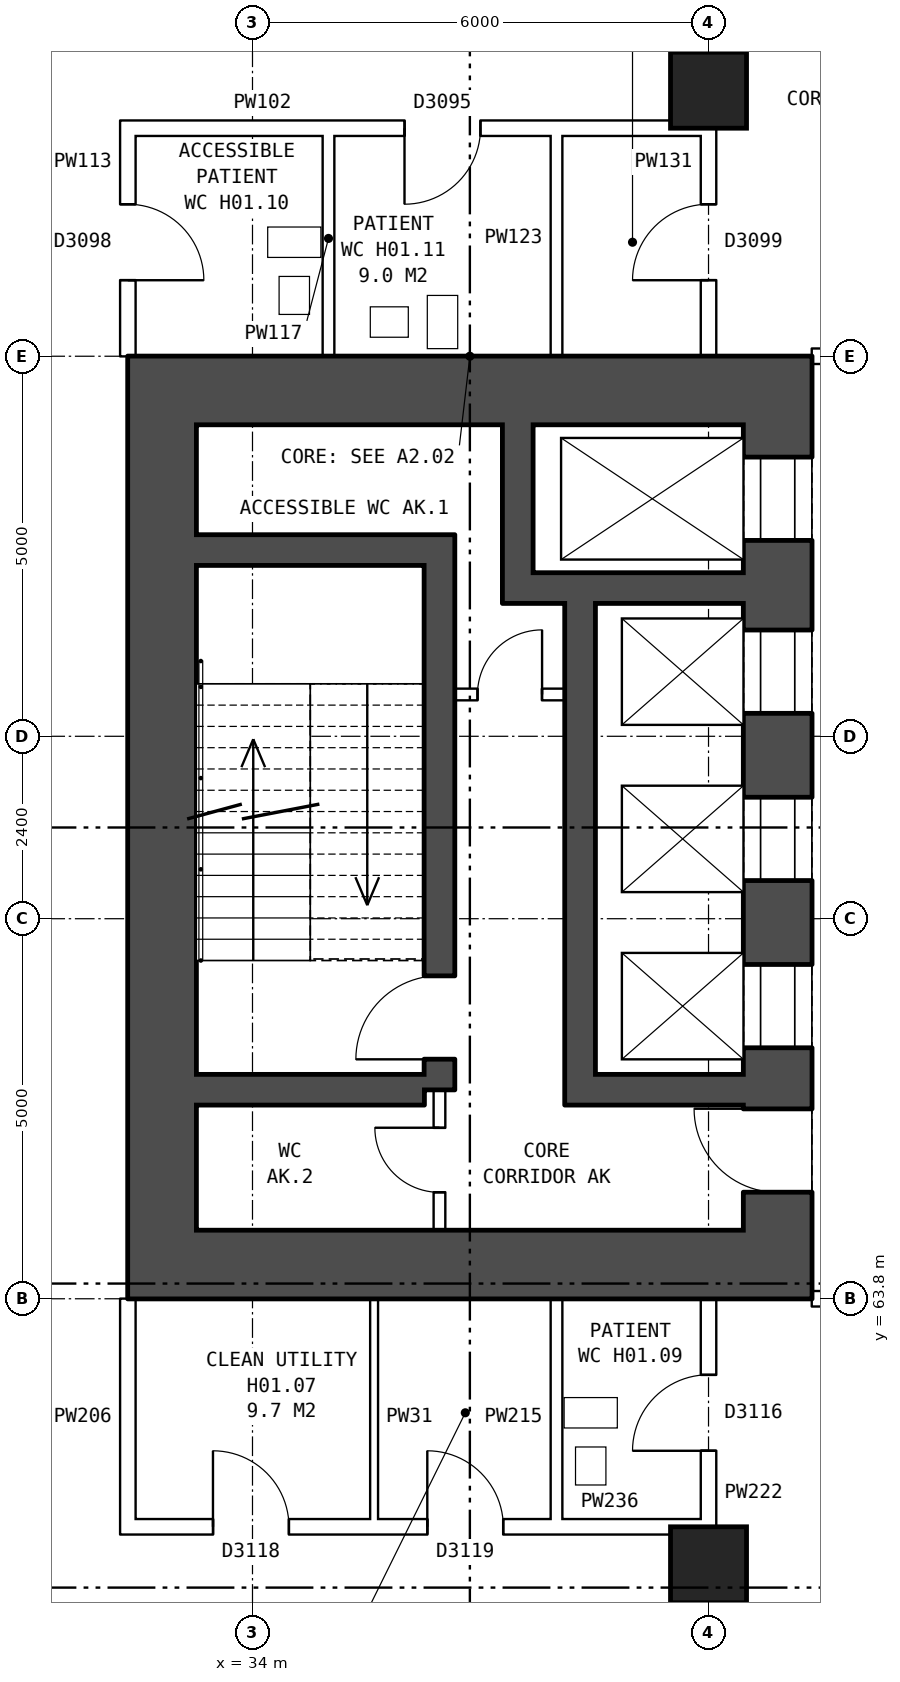
"""IFC4 building model, lengths in metres.
Left out: names, types, materials, properties, quantities, classifications, styles, units other than length and angle.
Written with IfcOpenShell. Run it as: python <this file> out.ifc"""

import sys

from ifc_helpers import new_model, si_unit, direction, frame, frame_2d, origin, origin_2d, place, context, subcontext, project, spatial, rectangle, extrude, element, fill, save


model = new_model("IFC4")
c1 = context("Model", 3, precision=1e-05, world=origin(), true_north=direction((0.0, 1.0)))
c2 = subcontext(c1, "Body", "Model", "MODEL_VIEW")
j1 = project(units=[si_unit("LENGTHUNIT", "METRE"), si_unit("PLANEANGLEUNIT", "RADIAN")], contexts=[c1])
p1 = place(None, origin())
s1 = spatial("IfcSite", under=j1, at=p1, CompositionType="ELEMENT")
p2 = place(p1, origin())
s2 = spatial("IfcBuilding", under=s1, at=p2, CompositionType="ELEMENT")
p3 = place(p2, frame((0.0, 0.0, 5.5)))
s3 = spatial("IfcBuildingStorey", under=s2, at=p3, CompositionType="ELEMENT", Elevation=5.5)
for number, where, z_axis, x_axis in (
    (1, (40.0, 60.3, 0.0), (0.0, 0.0, 1.0), (1.0, 0.0, 0.0)),
    (2, (40.0, 79.7, 0.0), (0.0, 0.0, 1.0), (1.0, 0.0, 0.0)),
):
    element("IfcColumn", number, at=place(p3, frame(where, z_axis=z_axis, x_axis=x_axis)), inside=s3, PredefinedType="COLUMN", context=c2, shape_type="SweptSolid", body=[
        extrude(rectangle(XDim=1.0, YDim=1.0, at=origin_2d()), origin(), (0.0, 0.0, 1.0), 4.3),
    ])
p4 = place(p3, frame((40.91, 75.3, 0.0), z_axis=(0.0, 0.0, 1.0), x_axis=(0.0, -1.0, 0.0)))
e3 = element("IfcWall", 3, at=p4, inside=s3, PredefinedType="SHEAR", context=c2, shape_type="SweptSolid", body=[
    extrude(rectangle(XDim=10.6, YDim=0.9, at=frame_2d((5.3, 0.0))), origin(), (0.0, 0.0, 1.0), 4.3),
])
p5 = place(p4, frame((0.425, 0.0, 0.0)))
e4 = element("IfcOpeningElement", 4, at=p5, cuts=e3, PredefinedType="OPENING", context=c2, shape_type="SweptSolid", body=[
    extrude(rectangle(XDim=1.1, YDim=2.1, at=frame_2d((0.55, 1.05))), frame((0.0, 0.46, 0.0), z_axis=(0.0, -1.0, 0.0), x_axis=(1.0, 0.0, 0.0)), (0.0, 0.0, 1.0), 0.92),
])
p6 = place(p4, frame((2.7, 0.0, 0.0)))
e5 = element("IfcOpeningElement", 5, at=p6, cuts=e3, PredefinedType="OPENING", context=c2, shape_type="SweptSolid", body=[
    extrude(rectangle(XDim=1.1, YDim=2.1, at=frame_2d((0.55, 1.05))), frame((0.0, 0.46, 0.0), z_axis=(0.0, -1.0, 0.0), x_axis=(1.0, 0.0, 0.0)), (0.0, 0.0, 1.0), 0.92),
])
p7 = place(p4, frame((4.9, 0.0, 0.0)))
e6 = element("IfcOpeningElement", 6, at=p7, cuts=e3, PredefinedType="OPENING", context=c2, shape_type="SweptSolid", body=[
    extrude(rectangle(XDim=1.1, YDim=2.1, at=frame_2d((0.55, 1.05))), frame((0.0, 0.46, 0.0), z_axis=(0.0, -1.0, 0.0), x_axis=(1.0, 0.0, 0.0)), (0.0, 0.0, 1.0), 0.92),
])
p8 = place(p4, frame((7.1, 0.0, 0.0)))
e7 = element("IfcOpeningElement", 7, at=p8, cuts=e3, PredefinedType="OPENING", context=c2, shape_type="SweptSolid", body=[
    extrude(rectangle(XDim=1.1, YDim=2.1, at=frame_2d((0.55, 1.05))), frame((0.0, 0.46, 0.0), z_axis=(0.0, -1.0, 0.0), x_axis=(1.0, 0.0, 0.0)), (0.0, 0.0, 1.0), 0.92),
])
p9 = place(p4, frame((9.0, 0.0, 0.0)))
e8 = element("IfcOpeningElement", 8, at=p9, cuts=e3, PredefinedType="OPENING", context=c2, shape_type="SweptSolid", body=[
    extrude(rectangle(XDim=1.1, YDim=2.1, at=frame_2d((0.55, 1.05))), frame((0.0, 0.46, 0.0), z_axis=(0.0, -1.0, 0.0), x_axis=(1.0, 0.0, 0.0)), (0.0, 0.0, 1.0), 0.92),
])
p10 = place(p3, frame((32.81, 75.3, 0.0), z_axis=(0.0, 0.0, 1.0), x_axis=(0.0, -1.0, 0.0)))
e9 = element("IfcWall", 9, at=p10, inside=s3, PredefinedType="SHEAR", context=c2, shape_type="SweptSolid", body=[
    extrude(rectangle(XDim=10.6, YDim=0.9, at=frame_2d((5.3, 0.0))), origin(), (0.0, 0.0, 1.0), 4.3),
])
for number, where, z_axis, x_axis in (
    (10, (41.36, 75.75, 0.0), (0.0, 0.0, 1.0), (-1.0, 0.0, 0.0)),
    (11, (41.36, 64.25, 0.0), (0.0, 0.0, 1.0), (-1.0, 0.0, 0.0)),
):
    element("IfcWall", number, at=place(p3, frame(where, z_axis=z_axis, x_axis=x_axis)), inside=s3, PredefinedType="SHEAR", context=c2, shape_type="SweptSolid", body=[
        extrude(rectangle(XDim=9.0, YDim=0.9, at=frame_2d((4.5, 0.0))), origin(), (0.0, 0.0, 1.0), 4.3),
    ])
p11 = place(p3, frame((36.26, 73.65, 0.0), z_axis=(0.0, 0.0, 1.0), x_axis=(-1.0, 0.0, 0.0)))
e12 = element("IfcWall", 12, at=p11, inside=s3, PredefinedType="SHEAR", context=c2, shape_type="SweptSolid", body=[
    extrude(rectangle(XDim=3.0, YDim=0.4, at=frame_2d((1.5, 0.0))), origin(), (0.0, 0.0, 1.0), 4.3),
])
p12 = place(p3, frame((40.46, 73.15, 0.0), z_axis=(0.0, 0.0, 1.0), x_axis=(-1.0, 0.0, 0.0)))
e13 = element("IfcWall", 13, at=p12, inside=s3, PredefinedType="SHEAR", context=c2, shape_type="SweptSolid", body=[
    extrude(rectangle(XDim=3.17, YDim=0.4, at=frame_2d((1.585, 0.0))), origin(), (0.0, 0.0, 1.0), 4.3),
])
p13 = place(p3, frame((38.11, 71.75, 0.0), z_axis=(0.0, 0.0, 1.0), x_axis=(-1.0, 0.0, 0.0)))
e14 = element("IfcWall", 14, at=p13, inside=s3, PredefinedType="PARTITIONING", context=c2, shape_type="SweptSolid", body=[
    extrude(rectangle(XDim=1.45, YDim=0.15, at=frame_2d((0.725, 0.0))), origin(), (0.0, 0.0, 1.0), 4.3),
])
p14 = place(p13, frame((0.3, 0.0, 0.0)))
e15 = element("IfcOpeningElement", 15, at=p14, cuts=e14, PredefinedType="OPENING", context=c2, shape_type="SweptSolid", body=[
    extrude(rectangle(XDim=0.85, YDim=2.1, at=frame_2d((0.425, 1.05))), frame((0.0, 0.085, 0.0), z_axis=(0.0, -1.0, 0.0), x_axis=(1.0, 0.0, 0.0)), (0.0, 0.0, 1.0), 0.17),
])
p15 = place(p3, frame((40.46, 66.55, 0.0), z_axis=(0.0, 0.0, 1.0), x_axis=(-1.0, 0.0, 0.0)))
e16 = element("IfcWall", 16, at=p15, inside=s3, PredefinedType="SHEAR", context=c2, shape_type="SweptSolid", body=[
    extrude(rectangle(XDim=1.95, YDim=0.4, at=frame_2d((0.975, 0.0))), origin(), (0.0, 0.0, 1.0), 4.3),
])
p16 = place(p3, frame((36.26, 66.55, 0.0), z_axis=(0.0, 0.0, 1.0), x_axis=(-1.0, 0.0, 0.0)))
e17 = element("IfcWall", 17, at=p16, inside=s3, PredefinedType="SHEAR", context=c2, shape_type="SweptSolid", body=[
    extrude(rectangle(XDim=3.0, YDim=0.4, at=frame_2d((1.5, 0.0))), origin(), (0.0, 0.0, 1.0), 4.3),
])
p17 = place(p3, frame((38.31, 72.95, 0.0), z_axis=(0.0, 0.0, 1.0), x_axis=(0.0, -1.0, 0.0)))
e18 = element("IfcWall", 18, at=p17, inside=s3, PredefinedType="SHEAR", context=c2, shape_type="SweptSolid", body=[
    extrude(rectangle(XDim=6.6, YDim=0.4, at=frame_2d((3.3, 0.0))), origin(), (0.0, 0.0, 1.0), 4.3),
])
p18 = place(p3, frame((37.49, 75.3, 0.0), z_axis=(0.0, 0.0, 1.0), x_axis=(0.0, -1.0, 0.0)))
e19 = element("IfcWall", 19, at=p18, inside=s3, PredefinedType="SHEAR", context=c2, shape_type="SweptSolid", body=[
    extrude(rectangle(XDim=1.95, YDim=0.4, at=frame_2d((0.975, 0.0))), origin(), (0.0, 0.0, 1.0), 4.3),
])
p19 = place(p3, frame((36.46, 73.85, 0.0), z_axis=(0.0, 0.0, 1.0), x_axis=(0.0, -1.0, 0.0)))
e20 = element("IfcWall", 20, at=p19, inside=s3, PredefinedType="SHEAR", context=c2, shape_type="SweptSolid", body=[
    extrude(rectangle(XDim=7.3, YDim=0.4, at=frame_2d((3.65, 0.0))), origin(), (0.0, 0.0, 1.0), 4.3),
])
p20 = place(p19, frame((5.8, 0.0, 0.0)))
e21 = element("IfcOpeningElement", 21, at=p20, cuts=e20, PredefinedType="OPENING", context=c2, shape_type="SweptSolid", body=[
    extrude(rectangle(XDim=1.1, YDim=2.1, at=frame_2d((0.55, 1.05))), frame((0.0, 0.21, 0.0), z_axis=(0.0, -1.0, 0.0), x_axis=(1.0, 0.0, 0.0)), (0.0, 0.0, 1.0), 0.42),
])
p21 = place(p3, frame((36.46, 66.55, 0.0), z_axis=(0.0, 0.0, 1.0), x_axis=(0.0, -1.0, 0.0)))
e22 = element("IfcWall", 22, at=p21, inside=s3, PredefinedType="PARTITIONING", context=c2, shape_type="SweptSolid", body=[
    extrude(rectangle(XDim=1.85, YDim=0.15, at=frame_2d((0.925, 0.0))), origin(), (0.0, 0.0, 1.0), 4.3),
])
p22 = place(p21, frame((0.5, 0.0, 0.0)))
e23 = element("IfcOpeningElement", 23, at=p22, cuts=e22, PredefinedType="OPENING", context=c2, shape_type="SweptSolid", body=[
    extrude(rectangle(XDim=0.85, YDim=2.1, at=frame_2d((0.425, 1.05))), frame((0.0, 0.085, 0.0), z_axis=(0.0, -1.0, 0.0), x_axis=(1.0, 0.0, 0.0)), (0.0, 0.0, 1.0), 0.17),
])
p23 = place(p3, frame((32.26, 60.8, 0.0), z_axis=(0.0, 0.0, 1.0), x_axis=(1.0, 0.0, 0.0)))
e24 = element("IfcWall", 24, at=p23, inside=s3, PredefinedType="PARTITIONING", context=c2, shape_type="SweptSolid", body=[
    extrude(rectangle(XDim=7.84, YDim=0.2, at=frame_2d((3.92, 0.0))), origin(), (0.0, 0.0, 1.0), 4.3),
])
p24 = place(p23, frame((1.22, 0.0, 0.0)))
e25 = element("IfcOpeningElement", 25, at=p24, cuts=e24, PredefinedType="OPENING", context=c2, shape_type="SweptSolid", body=[
    extrude(rectangle(XDim=1.0, YDim=2.1, at=frame_2d((0.5, 1.05))), frame((0.0, 0.11, 0.0), z_axis=(0.0, -1.0, 0.0), x_axis=(1.0, 0.0, 0.0)), (0.0, 0.0, 1.0), 0.22),
])
p25 = place(p23, frame((4.04, 0.0, 0.0)))
e26 = element("IfcOpeningElement", 26, at=p25, cuts=e24, PredefinedType="OPENING", context=c2, shape_type="SweptSolid", body=[
    extrude(rectangle(XDim=1.0, YDim=2.1, at=frame_2d((0.5, 1.05))), frame((0.0, 0.11, 0.0), z_axis=(0.0, -1.0, 0.0), x_axis=(1.0, 0.0, 0.0)), (0.0, 0.0, 1.0), 0.22),
])
p26 = place(p3, frame((41.36, 63.8, 0.0), z_axis=(0.0, 0.0, 1.0), x_axis=(1.0, 0.0, 0.0)))
e27 = element("IfcWall", 27, at=p26, inside=s3, PredefinedType="PARTITIONING", context=c2, shape_type="SweptSolid", body=[
    extrude(rectangle(XDim=2.54, YDim=0.2, at=frame_2d((1.27, 0.0))), origin(), (0.0, 0.0, 1.0), 4.3),
])
p27 = place(p26, frame((1.0, 0.0, 0.0)))
e28 = element("IfcOpeningElement", 28, at=p27, cuts=e27, PredefinedType="OPENING", context=c2, shape_type="SweptSolid", body=[
    extrude(rectangle(XDim=1.0, YDim=2.1, at=frame_2d((0.5, 1.05))), frame((0.0, 0.11, 0.0), z_axis=(0.0, -1.0, 0.0), x_axis=(1.0, 0.0, 0.0)), (0.0, 0.0, 1.0), 0.22),
])
p28 = place(p3, frame((41.36, 76.2, 0.0), z_axis=(0.0, 0.0, 1.0), x_axis=(1.0, 0.0, 0.0)))
e29 = element("IfcWall", 29, at=p28, inside=s3, PredefinedType="PARTITIONING", context=c2, shape_type="SweptSolid", body=[
    extrude(rectangle(XDim=2.54, YDim=0.2, at=frame_2d((1.27, 0.0))), origin(), (0.0, 0.0, 1.0), 4.3),
])
p29 = place(p28, frame((1.0, 0.0, 0.0)))
e30 = element("IfcOpeningElement", 30, at=p29, cuts=e29, PredefinedType="OPENING", context=c2, shape_type="SweptSolid", body=[
    extrude(rectangle(XDim=1.0, YDim=2.1, at=frame_2d((0.5, 1.05))), frame((0.0, 0.11, 0.0), z_axis=(0.0, -1.0, 0.0), x_axis=(1.0, 0.0, 0.0)), (0.0, 0.0, 1.0), 0.22),
])
p30 = place(p3, frame((32.26, 79.2, 0.0), z_axis=(0.0, 0.0, 1.0), x_axis=(1.0, 0.0, 0.0)))
e31 = element("IfcWall", 31, at=p30, inside=s3, PredefinedType="PARTITIONING", context=c2, shape_type="SweptSolid", body=[
    extrude(rectangle(XDim=7.84, YDim=0.2, at=frame_2d((3.92, 0.0))), origin(), (0.0, 0.0, 1.0), 4.3),
])
p31 = place(p30, frame((3.74, 0.0, 0.0)))
e32 = element("IfcOpeningElement", 32, at=p31, cuts=e31, PredefinedType="OPENING", context=c2, shape_type="SweptSolid", body=[
    extrude(rectangle(XDim=1.0, YDim=2.1, at=frame_2d((0.5, 1.05))), frame((0.0, 0.11, 0.0), z_axis=(0.0, -1.0, 0.0), x_axis=(1.0, 0.0, 0.0)), (0.0, 0.0, 1.0), 0.22),
])
p32 = place(p3, frame((32.36, 60.7, 0.0), z_axis=(0.0, 0.0, 1.0), x_axis=(0.0, 1.0, 0.0)))
e33 = element("IfcWall", 33, at=p32, inside=s3, PredefinedType="PARTITIONING", context=c2, shape_type="SweptSolid", body=[
    extrude(rectangle(XDim=3.1, YDim=0.2, at=frame_2d((1.55, 0.0))), origin(), (0.0, 0.0, 1.0), 4.3),
])
p33 = place(p3, frame((32.36, 76.2, 0.0), z_axis=(0.0, 0.0, 1.0), x_axis=(0.0, 1.0, 0.0)))
e34 = element("IfcWall", 34, at=p33, inside=s3, PredefinedType="PARTITIONING", context=c2, shape_type="SweptSolid", body=[
    extrude(rectangle(XDim=3.1, YDim=0.2, at=frame_2d((1.55, 0.0))), origin(), (0.0, 0.0, 1.0), 4.3),
])
p34 = place(p33, frame((1.0, 0.0, 0.0)))
e35 = element("IfcOpeningElement", 35, at=p34, cuts=e34, PredefinedType="OPENING", context=c2, shape_type="SweptSolid", body=[
    extrude(rectangle(XDim=1.0, YDim=2.1, at=frame_2d((0.5, 1.05))), frame((0.0, 0.11, 0.0), z_axis=(0.0, -1.0, 0.0), x_axis=(1.0, 0.0, 0.0)), (0.0, 0.0, 1.0), 0.22),
])
p35 = place(p3, frame((35.0, 76.2, 0.0), z_axis=(0.0, 0.0, 1.0), x_axis=(0.0, 1.0, 0.0)))
e36 = element("IfcWall", 36, at=p35, inside=s3, PredefinedType="PLUMBINGWALL", context=c2, shape_type="SweptSolid", body=[
    extrude(rectangle(XDim=3.1, YDim=0.15, at=frame_2d((1.55, 0.0))), origin(), (0.0, 0.0, 1.0), 4.3),
])
p36 = place(p3, frame((35.6, 60.7, 0.0), z_axis=(0.0, 0.0, 1.0), x_axis=(0.0, 1.0, 0.0)))
e37 = element("IfcWall", 37, at=p36, inside=s3, PredefinedType="PARTITIONING", context=c2, shape_type="SweptSolid", body=[
    extrude(rectangle(XDim=3.1, YDim=0.1, at=frame_2d((1.55, 0.0))), origin(), (0.0, 0.0, 1.0), 4.3),
])
for number, where, z_axis, x_axis in (
    (38, (38.0, 60.7, 0.0), (0.0, 0.0, 1.0), (0.0, 1.0, 0.0)),
    (39, (38.0, 76.2, 0.0), (0.0, 0.0, 1.0), (0.0, 1.0, 0.0)),
):
    element("IfcWall", number, at=place(p3, frame(where, z_axis=z_axis, x_axis=x_axis)), inside=s3, PredefinedType="PLUMBINGWALL", context=c2, shape_type="SweptSolid", body=[
        extrude(rectangle(XDim=3.1, YDim=0.15, at=frame_2d((1.55, 0.0))), origin(), (0.0, 0.0, 1.0), 4.3),
    ])
p37 = place(p3, frame((40.0, 60.7, 0.0), z_axis=(0.0, 0.0, 1.0), x_axis=(0.0, 1.0, 0.0)))
e40 = element("IfcWall", 40, at=p37, inside=s3, PredefinedType="PARTITIONING", context=c2, shape_type="SweptSolid", body=[
    extrude(rectangle(XDim=3.1, YDim=0.2, at=frame_2d((1.55, 0.0))), origin(), (0.0, 0.0, 1.0), 4.3),
])
p38 = place(p37, frame((1.1, 0.0, 0.0)))
e41 = element("IfcOpeningElement", 41, at=p38, cuts=e40, PredefinedType="OPENING", context=c2, shape_type="SweptSolid", body=[
    extrude(rectangle(XDim=1.0, YDim=2.1, at=frame_2d((0.5, 1.05))), frame((0.0, 0.11, 0.0), z_axis=(0.0, -1.0, 0.0), x_axis=(1.0, 0.0, 0.0)), (0.0, 0.0, 1.0), 0.22),
])
p39 = place(p3, frame((40.0, 76.2, 0.0), z_axis=(0.0, 0.0, 1.0), x_axis=(0.0, 1.0, 0.0)))
e42 = element("IfcWall", 42, at=p39, inside=s3, PredefinedType="PARTITIONING", context=c2, shape_type="SweptSolid", body=[
    extrude(rectangle(XDim=3.1, YDim=0.2, at=frame_2d((1.55, 0.0))), origin(), (0.0, 0.0, 1.0), 4.3),
])
p40 = place(p39, frame((1.0, 0.0, 0.0)))
e43 = element("IfcOpeningElement", 43, at=p40, cuts=e42, PredefinedType="OPENING", context=c2, shape_type="SweptSolid", body=[
    extrude(rectangle(XDim=1.0, YDim=2.1, at=frame_2d((0.5, 1.05))), frame((0.0, 0.11, 0.0), z_axis=(0.0, -1.0, 0.0), x_axis=(1.0, 0.0, 0.0)), (0.0, 0.0, 1.0), 0.22),
])
p41 = place(p5, origin())
e44 = element("IfcDoor", 44, at=p41, inside=s3, OperationType="DOUBLE_DOOR_SLIDING", PredefinedType="DOOR", context=c2, shape_type="SweptSolid", body=[
    extrude(rectangle(XDim=1.1, YDim=2.1, at=frame_2d((0.55, 1.05))), frame((0.0, -0.385, 0.0), z_axis=(0.0, -1.0, 0.0), x_axis=(1.0, 0.0, 0.0)), (0.0, 0.0, 1.0), 0.05),
])
fill(e4, e44)
p42 = place(p6, origin())
e45 = element("IfcDoor", 45, at=p42, inside=s3, OperationType="DOUBLE_DOOR_SLIDING", PredefinedType="DOOR", context=c2, shape_type="SweptSolid", body=[
    extrude(rectangle(XDim=1.1, YDim=2.1, at=frame_2d((0.55, 1.05))), frame((0.0, -0.385, 0.0), z_axis=(0.0, -1.0, 0.0), x_axis=(1.0, 0.0, 0.0)), (0.0, 0.0, 1.0), 0.05),
])
fill(e5, e45)
p43 = place(p7, origin())
e46 = element("IfcDoor", 46, at=p43, inside=s3, OperationType="DOUBLE_DOOR_SLIDING", PredefinedType="DOOR", context=c2, shape_type="SweptSolid", body=[
    extrude(rectangle(XDim=1.1, YDim=2.1, at=frame_2d((0.55, 1.05))), frame((0.0, -0.385, 0.0), z_axis=(0.0, -1.0, 0.0), x_axis=(1.0, 0.0, 0.0)), (0.0, 0.0, 1.0), 0.05),
])
fill(e6, e46)
p44 = place(p8, origin())
e47 = element("IfcDoor", 47, at=p44, inside=s3, OperationType="DOUBLE_DOOR_SLIDING", PredefinedType="DOOR", context=c2, shape_type="SweptSolid", body=[
    extrude(rectangle(XDim=1.1, YDim=2.1, at=frame_2d((0.55, 1.05))), frame((0.0, -0.385, 0.0), z_axis=(0.0, -1.0, 0.0), x_axis=(1.0, 0.0, 0.0)), (0.0, 0.0, 1.0), 0.05),
])
fill(e7, e47)
p45 = place(p9, frame((1.1, 0.0, 0.0), z_axis=(0.0, 0.0, 1.0), x_axis=(-1.0, 0.0, 0.0)))
e48 = element("IfcDoor", 48, at=p45, inside=s3, OperationType="SINGLE_SWING_RIGHT", PredefinedType="DOOR", context=c2, shape_type="SweptSolid", body=[
    extrude(rectangle(XDim=1.1, YDim=2.1, at=frame_2d((0.55, 1.05))), frame((0.0, 0.435, 0.0), z_axis=(0.0, -1.0, 0.0), x_axis=(1.0, 0.0, 0.0)), (0.0, 0.0, 1.0), 0.05),
])
fill(e8, e48)
p46 = place(p20, frame((1.1, 0.0, 0.0), z_axis=(0.0, 0.0, 1.0), x_axis=(-1.0, 0.0, 0.0)))
e49 = element("IfcDoor", 49, at=p46, inside=s3, OperationType="SINGLE_SWING_LEFT", PredefinedType="DOOR", context=c2, shape_type="SweptSolid", body=[
    extrude(rectangle(XDim=1.1, YDim=2.1, at=frame_2d((0.55, 1.05))), frame((0.0, 0.025, 0.0), z_axis=(0.0, -1.0, 0.0), x_axis=(1.0, 0.0, 0.0)), (0.0, 0.0, 1.0), 0.05),
])
fill(e21, e49)
p47 = place(p14, frame((0.85, 0.0, 0.0), z_axis=(0.0, 0.0, 1.0), x_axis=(-1.0, 0.0, 0.0)))
e50 = element("IfcDoor", 50, at=p47, inside=s3, OperationType="SINGLE_SWING_RIGHT", PredefinedType="DOOR", context=c2, shape_type="SweptSolid", body=[
    extrude(rectangle(XDim=0.85, YDim=2.1, at=frame_2d((0.425, 1.05))), frame((0.0, 0.025, 0.0), z_axis=(0.0, -1.0, 0.0), x_axis=(1.0, 0.0, 0.0)), (0.0, 0.0, 1.0), 0.05),
])
fill(e15, e50)
p48 = place(p22, frame((0.85, 0.0, 0.0), z_axis=(0.0, 0.0, 1.0), x_axis=(-1.0, 0.0, 0.0)))
e51 = element("IfcDoor", 51, at=p48, inside=s3, OperationType="SINGLE_SWING_RIGHT", PredefinedType="DOOR", context=c2, shape_type="SweptSolid", body=[
    extrude(rectangle(XDim=0.85, YDim=2.1, at=frame_2d((0.425, 1.05))), frame((0.0, 0.025, 0.0), z_axis=(0.0, -1.0, 0.0), x_axis=(1.0, 0.0, 0.0)), (0.0, 0.0, 1.0), 0.05),
])
fill(e23, e51)
p49 = place(p24, origin())
e52 = element("IfcDoor", 52, at=p49, inside=s3, OperationType="SINGLE_SWING_LEFT", PredefinedType="DOOR", context=c2, shape_type="SweptSolid", body=[
    extrude(rectangle(XDim=1.0, YDim=2.1, at=frame_2d((0.5, 1.05))), frame((0.0, 0.025, 0.0), z_axis=(0.0, -1.0, 0.0), x_axis=(1.0, 0.0, 0.0)), (0.0, 0.0, 1.0), 0.05),
])
fill(e25, e52)
p50 = place(p25, origin())
e53 = element("IfcDoor", 53, at=p50, inside=s3, OperationType="SINGLE_SWING_LEFT", PredefinedType="DOOR", context=c2, shape_type="SweptSolid", body=[
    extrude(rectangle(XDim=1.0, YDim=2.1, at=frame_2d((0.5, 1.05))), frame((0.0, 0.025, 0.0), z_axis=(0.0, -1.0, 0.0), x_axis=(1.0, 0.0, 0.0)), (0.0, 0.0, 1.0), 0.05),
])
fill(e26, e53)
p51 = place(p31, frame((1.0, 0.0, 0.0), z_axis=(0.0, 0.0, 1.0), x_axis=(-1.0, 0.0, 0.0)))
e54 = element("IfcDoor", 54, at=p51, inside=s3, OperationType="SINGLE_SWING_RIGHT", PredefinedType="DOOR", context=c2, shape_type="SweptSolid", body=[
    extrude(rectangle(XDim=1.0, YDim=2.1, at=frame_2d((0.5, 1.05))), frame((0.0, 0.025, 0.0), z_axis=(0.0, -1.0, 0.0), x_axis=(1.0, 0.0, 0.0)), (0.0, 0.0, 1.0), 0.05),
])
fill(e32, e54)
p52 = place(p34, frame((1.0, 0.0, 0.0), z_axis=(0.0, 0.0, 1.0), x_axis=(-1.0, 0.0, 0.0)))
e55 = element("IfcDoor", 55, at=p52, inside=s3, OperationType="SINGLE_SWING_RIGHT", PredefinedType="DOOR", context=c2, shape_type="SweptSolid", body=[
    extrude(rectangle(XDim=1.0, YDim=2.1, at=frame_2d((0.5, 1.05))), frame((0.0, 0.025, 0.0), z_axis=(0.0, -1.0, 0.0), x_axis=(1.0, 0.0, 0.0)), (0.0, 0.0, 1.0), 0.05),
])
fill(e35, e55)
p53 = place(p38, origin())
e56 = element("IfcDoor", 56, at=p53, inside=s3, OperationType="SINGLE_SWING_LEFT", PredefinedType="DOOR", context=c2, shape_type="SweptSolid", body=[
    extrude(rectangle(XDim=1.0, YDim=2.1, at=frame_2d((0.5, 1.05))), frame((0.0, 0.025, 0.0), z_axis=(0.0, -1.0, 0.0), x_axis=(1.0, 0.0, 0.0)), (0.0, 0.0, 1.0), 0.05),
])
fill(e41, e56)
p54 = place(p40, origin())
e57 = element("IfcDoor", 57, at=p54, inside=s3, OperationType="SINGLE_SWING_LEFT", PredefinedType="DOOR", context=c2, shape_type="SweptSolid", body=[
    extrude(rectangle(XDim=1.0, YDim=2.1, at=frame_2d((0.5, 1.05))), frame((0.0, 0.025, 0.0), z_axis=(0.0, -1.0, 0.0), x_axis=(1.0, 0.0, 0.0)), (0.0, 0.0, 1.0), 0.05),
])
fill(e43, e57)
save(model, sys.argv[1])
